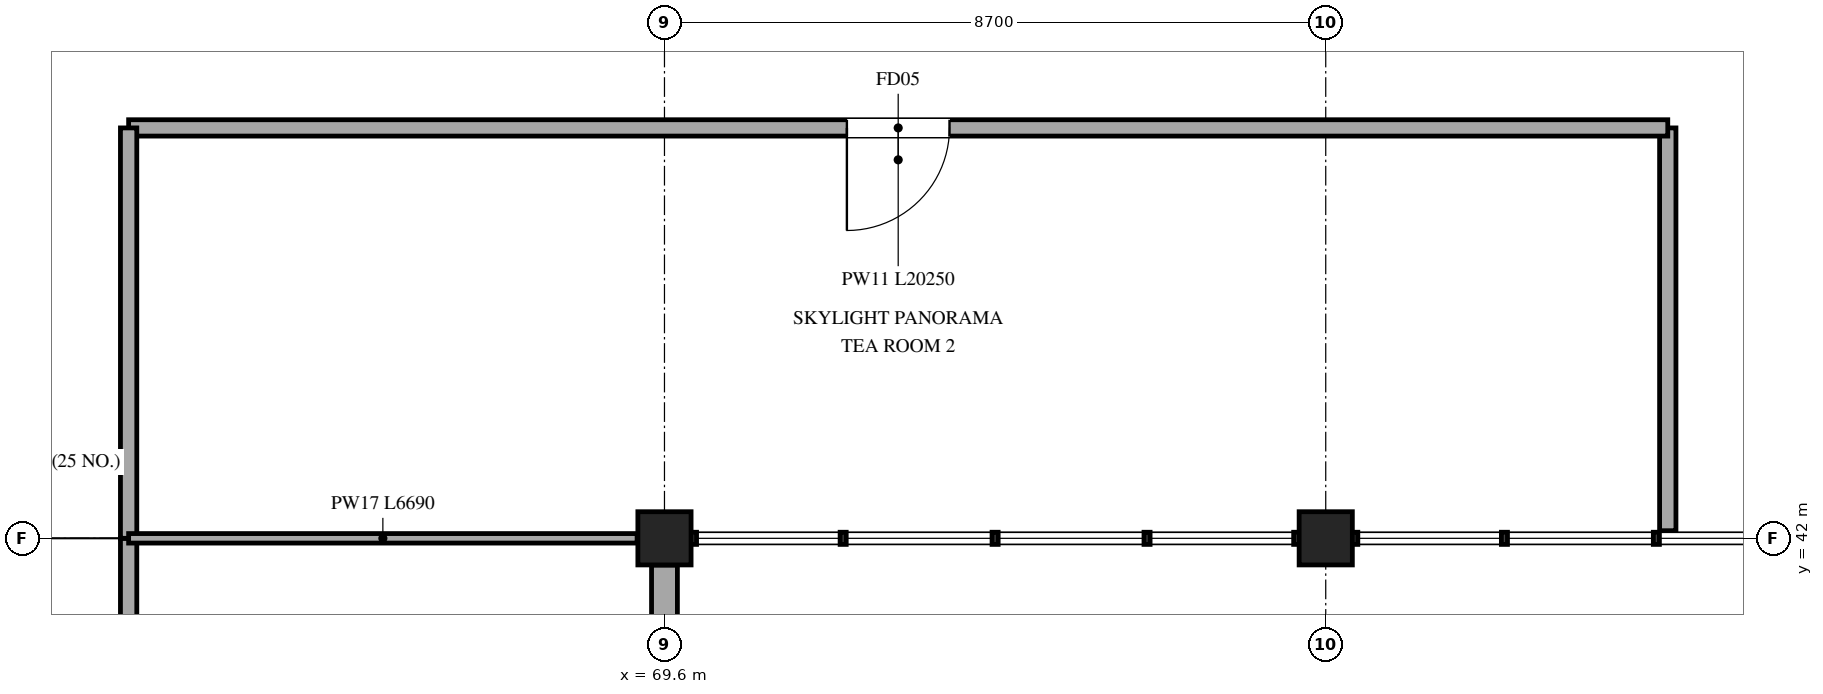
"""IFC4 building model, lengths in metres.
Left out: names, types, materials, properties, quantities, classifications, styles, units other than length and angle.
Written with IfcOpenShell. Run it as: python <this file> out.ifc"""

import sys

from ifc_helpers import new_model, si_unit, direction, frame, frame_2d, origin, origin_2d, place, context, subcontext, project, spatial, rectangle, extrude, element, fill, save


model = new_model("IFC4")
c1 = context("Model", 3, precision=1e-05, world=origin(), true_north=direction((0.0, 1.0)))
c2 = subcontext(c1, "Body", "Model", "MODEL_VIEW")
j1 = project(units=[si_unit("LENGTHUNIT", "METRE"), si_unit("PLANEANGLEUNIT", "RADIAN")], contexts=[c1])
p1 = place(None, origin())
s1 = spatial("IfcSite", under=j1, at=p1, CompositionType="ELEMENT")
p2 = place(p1, origin())
s2 = spatial("IfcBuilding", under=s1, at=p2, CompositionType="ELEMENT")
p3 = place(p2, frame((0.0, 0.0, 31.5)))
s3 = spatial("IfcBuildingStorey", under=s2, at=p3, CompositionType="ELEMENT", Elevation=31.5)
for number, where, z_axis, x_axis in (
    (1, (69.6, 42.0, 0.0), (0.0, 0.0, 1.0), (1.0, 0.0, 0.0)),
    (2, (78.3, 42.0, 0.0), (0.0, 0.0, 1.0), (1.0, 0.0, 0.0)),
):
    element("IfcColumn", number, at=place(p3, frame(where, z_axis=z_axis, x_axis=x_axis)), inside=s3, PredefinedType="COLUMN", context=c2, shape_type="SweptSolid", body=[
        extrude(rectangle(XDim=0.7, YDim=0.7, at=origin_2d()), origin(), (0.0, 0.0, 1.0), 4.8),
    ])
p4 = place(p3, frame((69.6, 41.648, 0.0), z_axis=(0.0, 0.0, 1.0), x_axis=(0.0, -1.0, 0.0)))
e3 = element("IfcWall", 3, at=p4, inside=s3, PredefinedType="STANDARD", context=c2, shape_type="SweptSolid", body=[
    extrude(rectangle(XDim=7.696, YDim=0.34, at=frame_2d((3.848, 0.0))), origin(), (0.0, 0.0, 1.0), 3.955),
])
p5 = place(p4, frame((0.81, 0.0, 0.85)))
e4 = element("IfcOpeningElement", 4, at=p5, cuts=e3, PredefinedType="OPENING", context=c2, shape_type="SweptSolid", body=[
    extrude(rectangle(XDim=1.8, YDim=1.6, at=frame_2d((0.9, 0.8))), frame((0.0, 0.18, 0.0), z_axis=(0.0, -1.0, 0.0), x_axis=(1.0, 0.0, 0.0)), (0.0, 0.0, 1.0), 0.36),
])
p6 = place(p3, frame((62.55, 42.0, 0.0), z_axis=(0.0, 0.0, 1.0), x_axis=(0.0, -1.0, 0.0)))
e5 = element("IfcWall", 5, at=p6, inside=s3, PredefinedType="PARTITIONING", context=c2, shape_type="SweptSolid", body=[
    extrude(rectangle(XDim=4.0, YDim=0.215, at=frame_2d((2.0, 0.0))), origin(), (0.0, 0.0, 1.0), 3.96),
])
p7 = place(p6, frame((1.325, 0.0, 0.0)))
e6 = element("IfcOpeningElement", 6, at=p7, cuts=e5, PredefinedType="OPENING", context=c2, shape_type="SweptSolid", body=[
    extrude(rectangle(XDim=1.35, YDim=2.2, at=frame_2d((0.675, 1.1))), frame((0.0, 0.118, 0.0), z_axis=(0.0, -1.0, 0.0), x_axis=(1.0, 0.0, 0.0)), (0.0, 0.0, 1.0), 0.235),
])
p8 = place(p3, frame((82.8, 42.1, 0.0), z_axis=(0.0, 0.0, 1.0), x_axis=(0.0, 1.0, 0.0)))
e7 = element("IfcWall", 7, at=p8, inside=s3, PredefinedType="PARTITIONING", context=c2, shape_type="SweptSolid", body=[
    extrude(rectangle(XDim=5.3, YDim=0.215, at=frame_2d((2.65, 0.0))), origin(), (0.0, 0.0, 1.0), 3.76),
])
p9 = place(p3, frame((82.8, 47.4, 0.0), z_axis=(0.0, 0.0, 1.0), x_axis=(-1.0, 0.0, 0.0)))
e8 = element("IfcWall", 8, at=p9, inside=s3, PredefinedType="PARTITIONING", context=c2, shape_type="SweptSolid", body=[
    extrude(rectangle(XDim=20.25, YDim=0.215, at=frame_2d((10.125, 0.0))), origin(), (0.0, 0.0, 1.0), 3.76),
])
p10 = place(p9, frame((9.45, 0.0, 0.0)))
e9 = element("IfcOpeningElement", 9, at=p10, cuts=e8, PredefinedType="OPENING", context=c2, shape_type="SweptSolid", body=[
    extrude(rectangle(XDim=1.35, YDim=2.2, at=frame_2d((0.675, 1.1))), frame((0.0, 0.118, 0.0), z_axis=(0.0, -1.0, 0.0), x_axis=(1.0, 0.0, 0.0)), (0.0, 0.0, 1.0), 0.235),
])
p11 = place(p3, frame((62.55, 47.4, 0.0), z_axis=(0.0, 0.0, 1.0), x_axis=(0.0, -1.0, 0.0)))
e10 = element("IfcWall", 10, at=p11, inside=s3, PredefinedType="PARTITIONING", context=c2, shape_type="SweptSolid", body=[
    extrude(rectangle(XDim=5.4, YDim=0.215, at=frame_2d((2.7, 0.0))), origin(), (0.0, 0.0, 1.0), 3.96),
])
p12 = place(p3, frame((62.55, 42.0, 0.0), z_axis=(0.0, 0.0, 1.0), x_axis=(1.0, 0.0, 0.0)))
e11 = element("IfcWall", 11, at=p12, inside=s3, PredefinedType="PARTITIONING", context=c2, shape_type="SweptSolid", body=[
    extrude(rectangle(XDim=6.69, YDim=0.125, at=frame_2d((3.345, 0.0))), origin(), (0.0, 0.0, 1.0), 3.96),
])
p13 = place(p10, origin())
e12 = element("IfcDoor", 12, at=p13, inside=s3, OperationType="SINGLE_SWING_RIGHT", PredefinedType="DOOR", context=c2, shape_type="SweptSolid", body=[
    extrude(rectangle(XDim=1.35, YDim=2.2, at=frame_2d((0.675, 1.1))), frame((0.0, 0.025, 0.0), z_axis=(0.0, -1.0, 0.0), x_axis=(1.0, 0.0, 0.0)), (0.0, 0.0, 1.0), 0.05),
])
fill(e9, e12)
save(model, sys.argv[1])
